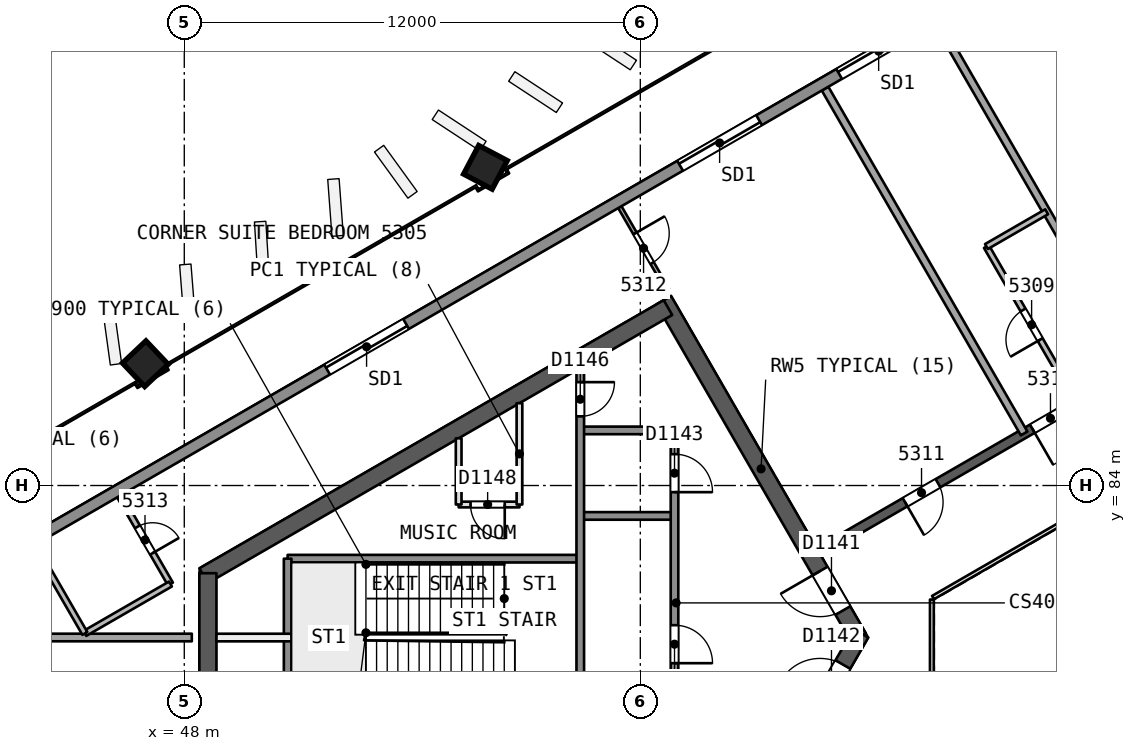
"""IFC4 building model, lengths in metres.
Left out: names, types, materials, properties, quantities, classifications, styles, units other than length and angle.
Written with IfcOpenShell. Run it as: python <this file> out.ifc"""

import sys

from ifc_helpers import new_model, si_unit, direction, frame, frame_2d, origin, origin_2d, place, context, subcontext, project, spatial, rectangle, extrude, element, fill, save


model = new_model("IFC4")
c1 = context("Model", 3, precision=1e-05, world=origin(), true_north=direction((0.0, 1.0)))
c2 = subcontext(c1, "Body", "Model", "MODEL_VIEW")
j1 = project(units=[si_unit("LENGTHUNIT", "METRE"), si_unit("PLANEANGLEUNIT", "RADIAN")], contexts=[c1])
p1 = place(None, origin())
s1 = spatial("IfcSite", under=j1, at=p1, CompositionType="ELEMENT")
p2 = place(p1, origin())
s2 = spatial("IfcBuilding", under=s1, at=p2, CompositionType="ELEMENT")
p3 = place(p2, frame((0.0, 0.0, 216.9)))
s3 = spatial("IfcBuildingStorey", under=s2, at=p3, CompositionType="ELEMENT", Elevation=216.9)
p4 = place(p3, frame((65.74, 80.0, 0.0), z_axis=(0.0, 0.0, 1.0), x_axis=(-0.499991857942, 0.866030104553, 0.0)))
e1 = element("IfcWall", 1, at=p4, inside=s3, PredefinedType="SHEAR", context=c2, shape_type="SweptSolid", body=[
    extrude(rectangle(XDim=10.25, YDim=0.45, at=frame_2d((5.125, 0.0))), origin(), (0.0, 0.0, 1.0), 3.7),
])
p5 = place(p4, frame((0.82, 0.0, 0.0)))
e2 = element("IfcOpeningElement", 2, at=p5, cuts=e1, PredefinedType="OPENING", context=c2, shape_type="SweptSolid", body=[
    extrude(rectangle(XDim=1.2, YDim=2.1, at=frame_2d((0.6, 1.05))), frame((0.0, 0.235, 0.0), z_axis=(0.0, -1.0, 0.0), x_axis=(1.0, 0.0, 0.0)), (0.0, 0.0, 1.0), 0.471),
])
p6 = place(p3, frame((60.728, 88.682, 0.0), z_axis=(0.0, 0.0, 1.0), x_axis=(-0.866021613849, -0.500006564303, 0.0)))
e3 = element("IfcWall", 3, at=p6, inside=s3, PredefinedType="SHEAR", context=c2, shape_type="SweptSolid", body=[
    extrude(rectangle(XDim=14.108, YDim=0.45, at=frame_2d((7.054, 0.0))), origin(), (0.0, 0.0, 1.0), 3.7),
])
p7 = place(p3, frame((48.622, 81.693, 0.0), z_axis=(0.0, 0.0, 1.0), x_axis=(0.0, -1.0, 0.0)))
e4 = element("IfcWall", 4, at=p7, inside=s3, PredefinedType="SHEAR", context=c2, shape_type="SweptSolid", body=[
    extrude(rectangle(XDim=3.515, YDim=0.45, at=frame_2d((1.758, 0.0))), origin(), (0.0, 0.0, 1.0), 3.7),
])
p8 = place(p3, frame((60.728, 71.318, 0.0), z_axis=(0.0, 0.0, 1.0), x_axis=(0.500012416173, 0.866018235185, 0.0)))
e5 = element("IfcWall", 5, at=p8, inside=s3, PredefinedType="SHEAR", context=c2, shape_type="SweptSolid", body=[
    extrude(rectangle(XDim=10.155, YDim=0.45, at=frame_2d((5.078, 0.0))), origin(), (0.0, 0.0, 1.0), 3.7),
])
p9 = place(p8, frame((8.005, 0.0, 0.0)))
e6 = element("IfcOpeningElement", 6, at=p9, cuts=e5, PredefinedType="OPENING", context=c2, shape_type="SweptSolid", body=[
    extrude(rectangle(XDim=1.2, YDim=2.1, at=frame_2d((0.6, 1.05))), frame((0.0, 0.235, 0.0), z_axis=(0.0, -1.0, 0.0), x_axis=(1.0, 0.0, 0.0)), (0.0, 0.0, 1.0), 0.471),
])
p10 = place(p3, frame((78.2, 90.046, 0.0), z_axis=(0.0, 0.0, 1.0), x_axis=(-0.866026492143, -0.499998114903, 0.0)))
e7 = element("IfcWall", 7, at=p10, inside=s3, PredefinedType="SHEAR", context=c2, shape_type="SweptSolid", body=[
    extrude(rectangle(XDim=15.588, YDim=0.25, at=frame_2d((7.794, 0.0))), origin(), (0.0, 0.0, 1.0), 3.3),
])
p11 = place(p10, frame((2.462, 0.0, 0.0)))
e8 = element("IfcOpeningElement", 8, at=p11, cuts=e7, PredefinedType="OPENING", context=c2, shape_type="SweptSolid", body=[
    extrude(rectangle(XDim=1.0, YDim=2.1, at=frame_2d((0.5, 1.05))), frame((0.0, 0.135, 0.0), z_axis=(0.0, -1.0, 0.0), x_axis=(1.0, 0.0, 0.0)), (0.0, 0.0, 1.0), 0.271),
])
p12 = place(p10, frame((8.003, 0.0, 0.0)))
e9 = element("IfcOpeningElement", 9, at=p12, cuts=e7, PredefinedType="OPENING", context=c2, shape_type="SweptSolid", body=[
    extrude(rectangle(XDim=1.1, YDim=2.1, at=frame_2d((0.55, 1.05))), frame((0.0, 0.135, 0.0), z_axis=(0.0, -1.0, 0.0), x_axis=(1.0, 0.0, 0.0)), (0.0, 0.0, 1.0), 0.271),
])
p13 = place(p10, frame((11.971, 0.0, 0.0)))
e10 = element("IfcOpeningElement", 10, at=p13, cuts=e7, PredefinedType="OPENING", context=c2, shape_type="SweptSolid", body=[
    extrude(rectangle(XDim=1.0, YDim=2.1, at=frame_2d((0.5, 1.05))), frame((0.0, 0.135, 0.0), z_axis=(0.0, -1.0, 0.0), x_axis=(1.0, 0.0, 0.0)), (0.0, 0.0, 1.0), 0.271),
])
p14 = place(p3, frame((55.901, 92.387, 0.0), z_axis=(0.019327242333, -0.012137244332, 0.999739538582), x_axis=(-0.500214328423, 0.865666448646, 0.020179824807)))
e11 = element("IfcColumn", 11, at=p14, inside=s3, PredefinedType="COLUMN", context=c2, shape_type="SweptSolid", body=[
    extrude(rectangle(XDim=0.85, YDim=0.85, at=origin_2d()), origin(), (0.0, 0.0, 1.0), 3.701),
])
p15 = place(p3, frame((46.94, 87.213, 0.0), z_axis=(0.028557219273, -0.006859008786, 0.999568626571), x_axis=(-0.498515256127, 0.866645794777, 0.020189249707)))
e12 = element("IfcColumn", 12, at=p15, inside=s3, PredefinedType="COLUMN", context=c2, shape_type="SweptSolid", body=[
    extrude(rectangle(XDim=0.85, YDim=0.85, at=origin_2d()), origin(), (0.0, 0.0, 1.0), 3.702),
])
p16 = place(p3, frame((67.831, 96.158, 0.0), z_axis=(0.0, 0.0, 1.0), x_axis=(0.500010879287, -0.866019122534, 0.0)))
e13 = element("IfcWall", 13, at=p16, inside=s3, PredefinedType="PARTITIONING", context=c2, shape_type="SweptSolid", body=[
    extrude(rectangle(XDim=10.478, YDim=0.2, at=frame_2d((5.239, 0.0))), origin(), (0.0, 0.0, 1.0), 3.3),
])
p17 = place(p3, frame((71.486, 86.169, 0.0), z_axis=(0.0, 0.0, 1.0), x_axis=(-0.499987613552, 0.866032554986, 0.0)))
e14 = element("IfcWall", 14, at=p17, inside=s3, PredefinedType="PARTITIONING", context=c2, shape_type="SweptSolid", body=[
    extrude(rectangle(XDim=4.755, YDim=0.15, at=frame_2d((2.378, 0.0))), origin(), (0.0, 0.0, 1.0), 3.3),
])
p18 = place(p17, frame((1.928, 0.0, 0.0)))
e15 = element("IfcOpeningElement", 15, at=p18, cuts=e14, PredefinedType="OPENING", context=c2, shape_type="SweptSolid", body=[
    extrude(rectangle(XDim=0.9, YDim=2.1, at=frame_2d((0.45, 1.05))), frame((0.0, 0.085, 0.0), z_axis=(0.0, -1.0, 0.0), x_axis=(1.0, 0.0, 0.0)), (0.0, 0.0, 1.0), 0.171),
])
p19 = place(p3, frame((69.108, 90.288, 0.0), z_axis=(0.0, 0.0, 1.0), x_axis=(0.866050016054, 0.499957367875, 0.0)))
e16 = element("IfcWall", 16, at=p19, inside=s3, PredefinedType="PARTITIONING", context=c2, shape_type="SweptSolid", body=[
    extrude(rectangle(XDim=1.829, YDim=0.15, at=frame_2d((0.915, 0.0))), origin(), (0.0, 0.0, 1.0), 3.3),
])
p20 = place(p3, frame((64.861, 94.443, 0.0), z_axis=(0.0, 0.0, 1.0), x_axis=(0.500010879287, -0.866019122534, 0.0)))
e17 = element("IfcWall", 17, at=p20, inside=s3, PredefinedType="PARTITIONING", context=c2, shape_type="SweptSolid", body=[
    extrude(rectangle(XDim=10.478, YDim=0.2, at=frame_2d((5.239, 0.0))), origin(), (0.0, 0.0, 1.0), 3.3),
])
p21 = place(p3, frame((59.461, 91.326, 0.0), z_axis=(0.0, 0.0, 1.0), x_axis=(0.499953629774, -0.866052173992, 0.0)))
e18 = element("IfcWall", 18, at=p21, inside=s3, PredefinedType="PARTITIONING", context=c2, shape_type="SweptSolid", body=[
    extrude(rectangle(XDim=2.499, YDim=0.1, at=frame_2d((1.25, 0.0))), origin(), (0.0, 0.0, 1.0), 3.3),
])
p22 = place(p21, frame((0.799, 0.0, 0.0)))
e19 = element("IfcOpeningElement", 19, at=p22, cuts=e18, PredefinedType="OPENING", context=c2, shape_type="SweptSolid", body=[
    extrude(rectangle(XDim=0.9, YDim=2.1, at=frame_2d((0.45, 1.05))), frame((0.0, 0.061, 0.0), z_axis=(0.0, -1.0, 0.0), x_axis=(1.0, 0.0, 0.0)), (0.0, 0.0, 1.0), 0.121),
])
p23 = place(p3, frame((46.298, 83.726, 0.0), z_axis=(0.0, 0.0, 1.0), x_axis=(0.500014634633, -0.86601695431, 0.0)))
e20 = element("IfcWall", 20, at=p23, inside=s3, PredefinedType="PARTITIONING", context=c2, shape_type="SweptSolid", body=[
    extrude(rectangle(XDim=2.676, YDim=0.15, at=frame_2d((1.338, 0.0))), origin(), (0.0, 0.0, 1.0), 3.3),
])
p24 = place(p23, frame((0.938, 0.0, 0.0)))
e21 = element("IfcOpeningElement", 21, at=p24, cuts=e20, PredefinedType="OPENING", context=c2, shape_type="SweptSolid", body=[
    extrude(rectangle(XDim=0.8, YDim=2.1, at=frame_2d((0.4, 1.05))), frame((0.0, 0.085, 0.0), z_axis=(0.0, -1.0, 0.0), x_axis=(1.0, 0.0, 0.0)), (0.0, 0.0, 1.0), 0.171),
])
p25 = place(p3, frame((47.636, 81.408, 0.0), z_axis=(0.0, 0.0, 1.0), x_axis=(-0.866021400173, -0.500006934395, 0.0)))
e22 = element("IfcWall", 22, at=p25, inside=s3, PredefinedType="PARTITIONING", context=c2, shape_type="SweptSolid", body=[
    extrude(rectangle(XDim=2.6, YDim=0.15, at=frame_2d((1.3, 0.0))), origin(), (0.0, 0.0, 1.0), 3.3),
])
p26 = place(p3, frame((45.384, 80.108, 0.0), z_axis=(0.0, 0.0, 1.0), x_axis=(-0.500025973189, 0.866010407637, 0.0)))
e23 = element("IfcWall", 23, at=p26, inside=s3, PredefinedType="PARTITIONING", context=c2, shape_type="SweptSolid", body=[
    extrude(rectangle(XDim=2.344, YDim=0.15, at=frame_2d((1.172, 0.0))), origin(), (0.0, 0.0, 1.0), 3.3),
])
p27 = place(p3, frame((44.212, 80.001, 0.0), z_axis=(0.0, 0.0, 1.0), x_axis=(1.0, 0.0, 0.0)))
e24 = element("IfcWall", 24, at=p27, inside=s3, PredefinedType="PARTITIONING", context=c2, shape_type="SweptSolid", body=[
    extrude(rectangle(XDim=3.986, YDim=0.2, at=frame_2d((1.993, 0.0))), origin(), (0.0, 0.0, 1.0), 3.3),
])
p28 = place(p3, frame((44.063, 82.607, 0.0), z_axis=(0.0, 0.0, 1.0), x_axis=(0.866024402399, 0.500001734447, 0.0)))
e25 = element("IfcWall", 25, at=p28, inside=s3, PredefinedType="SOLIDWALL", context=c2, shape_type="SweptSolid", body=[
    extrude(rectangle(XDim=50.977, YDim=0.3, at=frame_2d((25.488, 0.0))), origin(), (0.0, 0.0, 1.0), 3.3),
])
p29 = place(p28, frame((24.444, 0.0, 0.0)))
e26 = element("IfcOpeningElement", 26, at=p29, cuts=e25, PredefinedType="OPENING", context=c2, shape_type="SweptSolid", body=[
    extrude(rectangle(XDim=2.4, YDim=2.4, at=frame_2d((1.2, 1.2))), frame((0.0, 0.161, 0.0), z_axis=(0.0, -1.0, 0.0), x_axis=(1.0, 0.0, 0.0)), (0.0, 0.0, 1.0), 0.321),
])
p30 = place(p28, frame((29.121, 0.0, 0.0)))
e27 = element("IfcOpeningElement", 27, at=p30, cuts=e25, PredefinedType="OPENING", context=c2, shape_type="SweptSolid", body=[
    extrude(rectangle(XDim=2.4, YDim=2.4, at=frame_2d((1.2, 1.2))), frame((0.0, 0.161, 0.0), z_axis=(0.0, -1.0, 0.0), x_axis=(1.0, 0.0, 0.0)), (0.0, 0.0, 1.0), 0.321),
])
p31 = place(p28, frame((39.656, 0.0, 0.0)))
e28 = element("IfcOpeningElement", 28, at=p31, cuts=e25, PredefinedType="OPENING", context=c2, shape_type="SweptSolid", body=[
    extrude(rectangle(XDim=2.4, YDim=2.4, at=frame_2d((1.2, 1.2))), frame((0.0, 0.161, 0.0), z_axis=(0.0, -1.0, 0.0), x_axis=(1.0, 0.0, 0.0)), (0.0, 0.0, 1.0), 0.321),
])
p32 = place(p28, frame((19.612, 0.0, 0.0)))
e29 = element("IfcOpeningElement", 29, at=p32, cuts=e25, PredefinedType="OPENING", context=c2, shape_type="SweptSolid", body=[
    extrude(rectangle(XDim=2.4, YDim=2.4, at=frame_2d((1.2, 1.2))), frame((0.0, 0.161, 0.0), z_axis=(0.0, -1.0, 0.0), x_axis=(1.0, 0.0, 0.0)), (0.0, 0.0, 1.0), 0.321),
])
p33 = place(p28, frame((8.885, 0.0, 0.0)))
e30 = element("IfcOpeningElement", 30, at=p33, cuts=e25, PredefinedType="OPENING", context=c2, shape_type="SweptSolid", body=[
    extrude(rectangle(XDim=2.4, YDim=2.4, at=frame_2d((1.2, 1.2))), frame((0.0, 0.161, 0.0), z_axis=(0.0, -1.0, 0.0), x_axis=(1.0, 0.0, 0.0)), (0.0, 0.0, 1.0), 0.321),
])
p34 = place(p3, frame((60.9, 85.45, 0.0), z_axis=(0.0, 0.0, 1.0), x_axis=(-1.0, 0.0, 0.0)))
e31 = element("IfcWall", 31, at=p34, inside=s3, PredefinedType="SOLIDWALL", context=c2, shape_type="SweptSolid", body=[
    extrude(rectangle(XDim=2.48, YDim=0.2, at=frame_2d((1.24, 0.0))), origin(), (0.0, 0.0, 1.0), 3.3),
])
p35 = place(p3, frame((56.82, 83.5, 0.0), z_axis=(0.0, 0.0, 1.0), x_axis=(-1.0, 0.0, 0.0)))
e32 = element("IfcWall", 32, at=p35, inside=s3, PredefinedType="PARTITIONING", context=c2, shape_type="SweptSolid", body=[
    extrude(rectangle(XDim=1.6, YDim=0.15, at=frame_2d((0.8, 0.0))), origin(), (0.0, 0.0, 1.0), 3.3),
])
p36 = place(p35, frame((0.387, 0.0, 0.0)))
e33 = element("IfcOpeningElement", 33, at=p36, cuts=e32, PredefinedType="OPENING", context=c2, shape_type="SweptSolid", body=[
    extrude(rectangle(XDim=0.9, YDim=2.1, at=frame_2d((0.45, 1.05))), frame((0.0, 0.085, 0.0), z_axis=(0.0, -1.0, 0.0), x_axis=(1.0, 0.0, 0.0)), (0.0, 0.0, 1.0), 0.171),
])
p37 = place(p3, frame((60.9, 83.2, 0.0), z_axis=(0.0, 0.0, 1.0), x_axis=(-1.0, 0.0, 0.0)))
e34 = element("IfcWall", 34, at=p37, inside=s3, PredefinedType="SOLIDWALL", context=c2, shape_type="SweptSolid", body=[
    extrude(rectangle(XDim=2.48, YDim=0.2, at=frame_2d((1.24, 0.0))), origin(), (0.0, 0.0, 1.0), 3.3),
])
p38 = place(p3, frame((58.42, 82.075, 0.0), z_axis=(0.0, 0.0, 1.0), x_axis=(-1.0, 0.0, 0.0)))
e35 = element("IfcWall", 35, at=p38, inside=s3, PredefinedType="SOLIDWALL", context=c2, shape_type="SweptSolid", body=[
    extrude(rectangle(XDim=7.7, YDim=0.2, at=frame_2d((3.85, 0.0))), origin(), (0.0, 0.0, 1.0), 3.3),
])
p39 = place(p3, frame((50.82, 80.0, 0.0), z_axis=(0.0, 0.0, 1.0), x_axis=(-1.0, 0.0, 0.0)))
e36 = element("IfcWall", 36, at=p39, inside=s3, PredefinedType="PARTITIONING", context=c2, shape_type="SweptSolid", body=[
    extrude(rectangle(XDim=1.973, YDim=0.2, at=frame_2d((0.987, 0.0))), origin(), (0.0, 0.0, 1.0), 3.3),
])
p40 = place(p3, frame((60.9, 85.45, 0.0), z_axis=(0.0, 0.0, 1.0), x_axis=(0.0, -1.0, 0.0)))
e37 = element("IfcWall", 37, at=p40, inside=s3, PredefinedType="SOLIDWALL", context=c2, shape_type="SweptSolid", body=[
    extrude(rectangle(XDim=10.9, YDim=0.2, at=frame_2d((5.45, 0.0))), origin(), (0.0, 0.0, 1.0), 3.3),
])
p41 = place(p40, frame((0.625, 0.0, 0.0)))
e38 = element("IfcOpeningElement", 38, at=p41, cuts=e37, PredefinedType="OPENING", context=c2, shape_type="SweptSolid", body=[
    extrude(rectangle(XDim=1.0, YDim=2.1, at=frame_2d((0.5, 1.05))), frame((0.0, 0.11, 0.0), z_axis=(0.0, -1.0, 0.0), x_axis=(1.0, 0.0, 0.0)), (0.0, 0.0, 1.0), 0.221),
])
p42 = place(p40, frame((5.125, 0.0, 0.0)))
e39 = element("IfcOpeningElement", 39, at=p42, cuts=e37, PredefinedType="OPENING", context=c2, shape_type="SweptSolid", body=[
    extrude(rectangle(XDim=1.0, YDim=2.1, at=frame_2d((0.5, 1.05))), frame((0.0, 0.11, 0.0), z_axis=(0.0, -1.0, 0.0), x_axis=(1.0, 0.0, 0.0)), (0.0, 0.0, 1.0), 0.221),
])
p43 = place(p3, frame((58.42, 87.09, 0.0), z_axis=(0.0, 0.0, 1.0), x_axis=(0.0, -1.0, 0.0)))
e40 = element("IfcWall", 40, at=p43, inside=s3, PredefinedType="SOLIDWALL", context=c2, shape_type="SweptSolid", body=[
    extrude(rectangle(XDim=10.64, YDim=0.2, at=frame_2d((5.32, 0.0))), origin(), (0.0, 0.0, 1.0), 3.3),
])
p44 = place(p43, frame((0.37, 0.0, 0.0)))
e41 = element("IfcOpeningElement", 41, at=p44, cuts=e40, PredefinedType="OPENING", context=c2, shape_type="SweptSolid", body=[
    extrude(rectangle(XDim=0.9, YDim=2.1, at=frame_2d((0.45, 1.05))), frame((0.0, 0.11, 0.0), z_axis=(0.0, -1.0, 0.0), x_axis=(1.0, 0.0, 0.0)), (0.0, 0.0, 1.0), 0.221),
])
p45 = place(p3, frame((56.82, 86.166, 0.0), z_axis=(0.0, 0.0, 1.0), x_axis=(0.0, -1.0, 0.0)))
e42 = element("IfcWall", 42, at=p45, inside=s3, PredefinedType="PARTITIONING", context=c2, shape_type="SweptSolid", body=[
    extrude(rectangle(XDim=2.666, YDim=0.15, at=frame_2d((1.333, 0.0))), origin(), (0.0, 0.0, 1.0), 3.3),
])
p46 = place(p3, frame((55.22, 85.242, 0.0), z_axis=(0.0, 0.0, 1.0), x_axis=(0.0, -1.0, 0.0)))
e43 = element("IfcWall", 43, at=p46, inside=s3, PredefinedType="PARTITIONING", context=c2, shape_type="SweptSolid", body=[
    extrude(rectangle(XDim=1.742, YDim=0.15, at=frame_2d((0.871, 0.0))), origin(), (0.0, 0.0, 1.0), 3.3),
])
p47 = place(p3, frame((50.72, 82.075, 0.0), z_axis=(0.0, 0.0, 1.0), x_axis=(0.0, -1.0, 0.0)))
e44 = element("IfcWall", 44, at=p47, inside=s3, PredefinedType="SOLIDWALL", context=c2, shape_type="SweptSolid", body=[
    extrude(rectangle(XDim=4.15, YDim=0.2, at=frame_2d((2.075, 0.0))), origin(), (0.0, 0.0, 1.0), 3.3),
])
p48 = place(p3, frame((77.738, 86.846, 0.0), z_axis=(0.0, 0.0, 1.0), x_axis=(-0.866026658274, -0.499997827154, 0.0)))
e45 = element("IfcWall", 45, at=p48, inside=s3, PredefinedType="PARTITIONING", context=c2, shape_type="SweptSolid", body=[
    extrude(rectangle(XDim=11.588, YDim=0.1, at=frame_2d((5.794, 0.0))), origin(), (0.0, 0.0, 1.0), 3.3),
])
p49 = place(p3, frame((67.672, 81.0, 0.0), z_axis=(0.0, 0.0, 1.0), x_axis=(0.0, -1.0, 0.0)))
e46 = element("IfcWall", 46, at=p49, inside=s3, PredefinedType="PARTITIONING", context=c2, shape_type="SweptSolid", body=[
    extrude(rectangle(XDim=2.0, YDim=0.1, at=frame_2d((1.0, 0.0))), origin(), (0.0, 0.0, 1.0), 3.3),
])
p50 = place(p18, origin())
e47 = element("IfcDoor", 47, at=p50, inside=s3, OperationType="SINGLE_SWING_LEFT", PredefinedType="NOTDEFINED", context=c2, shape_type="SweptSolid", body=[
    extrude(rectangle(XDim=0.9, YDim=2.1, at=frame_2d((0.45, 1.05))), frame((0.0, 0.025, 0.0), z_axis=(0.0, -1.0, 0.0), x_axis=(1.0, 0.0, 0.0)), (0.0, 0.0, 1.0), 0.05),
])
fill(e15, e47)
p51 = place(p12, origin())
e48 = element("IfcDoor", 48, at=p51, inside=s3, OperationType="SINGLE_SWING_RIGHT", PredefinedType="NOTDEFINED", context=c2, shape_type="SweptSolid", body=[
    extrude(rectangle(XDim=1.1, YDim=2.1, at=frame_2d((0.55, 1.05))), frame((0.0, 0.025, 0.0), z_axis=(0.0, -1.0, 0.0), x_axis=(1.0, 0.0, 0.0)), (0.0, 0.0, 1.0), 0.05),
])
fill(e9, e48)
p52 = place(p13, origin())
e49 = element("IfcDoor", 49, at=p52, inside=s3, OperationType="SINGLE_SWING_RIGHT", PredefinedType="NOTDEFINED", context=c2, shape_type="SweptSolid", body=[
    extrude(rectangle(XDim=1.0, YDim=2.1, at=frame_2d((0.5, 1.05))), frame((0.0, 0.025, 0.0), z_axis=(0.0, -1.0, 0.0), x_axis=(1.0, 0.0, 0.0)), (0.0, 0.0, 1.0), 0.05),
])
fill(e10, e49)
p53 = place(p22, origin())
e50 = element("IfcDoor", 50, at=p53, inside=s3, OperationType="SINGLE_SWING_LEFT", PredefinedType="NOTDEFINED", context=c2, shape_type="SweptSolid", body=[
    extrude(rectangle(XDim=0.9, YDim=2.1, at=frame_2d((0.45, 1.05))), frame((0.0, 0.025, 0.0), z_axis=(0.0, -1.0, 0.0), x_axis=(1.0, 0.0, 0.0)), (0.0, 0.0, 1.0), 0.05),
])
fill(e19, e50)
p54 = place(p24, origin())
e51 = element("IfcDoor", 51, at=p54, inside=s3, OperationType="SINGLE_SWING_RIGHT", PredefinedType="NOTDEFINED", context=c2, shape_type="SweptSolid", body=[
    extrude(rectangle(XDim=0.8, YDim=2.1, at=frame_2d((0.4, 1.05))), frame((0.0, 0.025, 0.0), z_axis=(0.0, -1.0, 0.0), x_axis=(1.0, 0.0, 0.0)), (0.0, 0.0, 1.0), 0.05),
])
fill(e21, e51)
p55 = place(p29, origin())
e52 = element("IfcDoor", 52, at=p55, inside=s3, OperationType="SLIDING_TO_LEFT", PredefinedType="NOTDEFINED", context=c2, shape_type="SweptSolid", body=[
    extrude(rectangle(XDim=2.4, YDim=2.4, at=frame_2d((1.2, 1.2))), frame((0.0, 0.025, 0.0), z_axis=(0.0, -1.0, 0.0), x_axis=(1.0, 0.0, 0.0)), (0.0, 0.0, 1.0), 0.05),
])
fill(e26, e52)
p56 = place(p32, origin())
e53 = element("IfcDoor", 53, at=p56, inside=s3, OperationType="SLIDING_TO_RIGHT", PredefinedType="NOTDEFINED", context=c2, shape_type="SweptSolid", body=[
    extrude(rectangle(XDim=2.4, YDim=2.4, at=frame_2d((1.2, 1.2))), frame((0.0, 0.025, 0.0), z_axis=(0.0, -1.0, 0.0), x_axis=(1.0, 0.0, 0.0)), (0.0, 0.0, 1.0), 0.05),
])
fill(e29, e53)
p57 = place(p33, origin())
e54 = element("IfcDoor", 54, at=p57, inside=s3, OperationType="SLIDING_TO_LEFT", PredefinedType="NOTDEFINED", context=c2, shape_type="SweptSolid", body=[
    extrude(rectangle(XDim=2.4, YDim=2.4, at=frame_2d((1.2, 1.2))), frame((0.0, 0.025, 0.0), z_axis=(0.0, -1.0, 0.0), x_axis=(1.0, 0.0, 0.0)), (0.0, 0.0, 1.0), 0.05),
])
fill(e30, e54)
p58 = place(p5, origin())
e55 = element("IfcDoor", 55, at=p58, inside=s3, OperationType="SINGLE_SWING_RIGHT", PredefinedType="NOTDEFINED", context=c2, shape_type="SweptSolid", body=[
    extrude(rectangle(XDim=1.2, YDim=2.1, at=frame_2d((0.6, 1.05))), frame((0.0, 0.025, 0.0), z_axis=(0.0, -1.0, 0.0), x_axis=(1.0, 0.0, 0.0)), (0.0, 0.0, 1.0), 0.05),
])
fill(e2, e55)
p59 = place(p9, origin())
e56 = element("IfcDoor", 56, at=p59, inside=s3, OperationType="SINGLE_SWING_LEFT", PredefinedType="NOTDEFINED", context=c2, shape_type="SweptSolid", body=[
    extrude(rectangle(XDim=1.2, YDim=2.1, at=frame_2d((0.6, 1.05))), frame((0.0, 0.025, 0.0), z_axis=(0.0, -1.0, 0.0), x_axis=(1.0, 0.0, 0.0)), (0.0, 0.0, 1.0), 0.05),
])
fill(e6, e56)
p60 = place(p41, origin())
e57 = element("IfcDoor", 57, at=p60, inside=s3, OperationType="SINGLE_SWING_RIGHT", PredefinedType="NOTDEFINED", context=c2, shape_type="SweptSolid", body=[
    extrude(rectangle(XDim=1.0, YDim=2.1, at=frame_2d((0.5, 1.05))), frame((0.0, 0.025, 0.0), z_axis=(0.0, -1.0, 0.0), x_axis=(1.0, 0.0, 0.0)), (0.0, 0.0, 1.0), 0.05),
])
fill(e38, e57)
p61 = place(p42, origin())
e58 = element("IfcDoor", 58, at=p61, inside=s3, OperationType="SINGLE_SWING_RIGHT", PredefinedType="NOTDEFINED", context=c2, shape_type="SweptSolid", body=[
    extrude(rectangle(XDim=1.0, YDim=2.1, at=frame_2d((0.5, 1.05))), frame((0.0, 0.025, 0.0), z_axis=(0.0, -1.0, 0.0), x_axis=(1.0, 0.0, 0.0)), (0.0, 0.0, 1.0), 0.05),
])
fill(e39, e58)
p62 = place(p44, origin())
e59 = element("IfcDoor", 59, at=p62, inside=s3, OperationType="SINGLE_SWING_LEFT", PredefinedType="NOTDEFINED", context=c2, shape_type="SweptSolid", body=[
    extrude(rectangle(XDim=0.9, YDim=2.1, at=frame_2d((0.45, 1.05))), frame((0.0, 0.025, 0.0), z_axis=(0.0, -1.0, 0.0), x_axis=(1.0, 0.0, 0.0)), (0.0, 0.0, 1.0), 0.05),
])
fill(e41, e59)
p63 = place(p36, origin())
e60 = element("IfcDoor", 60, at=p63, inside=s3, OperationType="SINGLE_SWING_LEFT", PredefinedType="NOTDEFINED", context=c2, shape_type="SweptSolid", body=[
    extrude(rectangle(XDim=0.9, YDim=2.1, at=frame_2d((0.45, 1.05))), frame((0.0, 0.025, 0.0), z_axis=(0.0, -1.0, 0.0), x_axis=(1.0, 0.0, 0.0)), (0.0, 0.0, 1.0), 0.05),
])
fill(e33, e60)
save(model, sys.argv[1])
